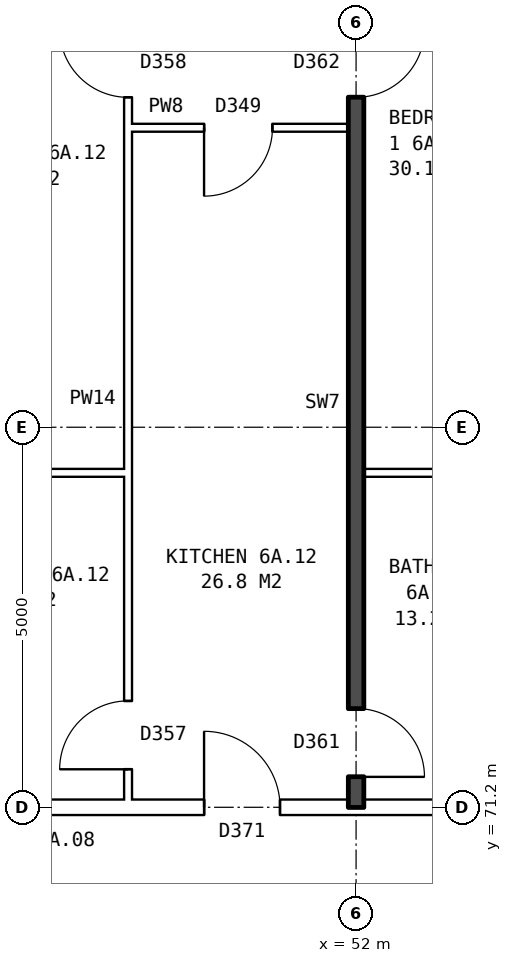
"""IFC4 building model, lengths in metres.
Left out: names, types, materials, properties, quantities, classifications, styles, units other than length and angle.
Written with IfcOpenShell. Run it as: python <this file> out.ifc"""

import sys

from ifc_helpers import new_model, si_unit, direction, frame, frame_2d, origin, place, context, subcontext, project, spatial, rectangle, extrude, element, fill, save


model = new_model("IFC4")
c1 = context("Model", 3, precision=1e-05, world=origin(), true_north=direction((0.0, 1.0)))
c2 = subcontext(c1, "Body", "Model", "MODEL_VIEW")
j1 = project(units=[si_unit("LENGTHUNIT", "METRE"), si_unit("PLANEANGLEUNIT", "RADIAN")], contexts=[c1])
p1 = place(None, origin())
s1 = spatial("IfcSite", under=j1, at=p1, CompositionType="ELEMENT")
p2 = place(p1, origin())
s2 = spatial("IfcBuilding", under=s1, at=p2, CompositionType="ELEMENT")
p3 = place(p2, frame((0.0, 0.0, 25.7)))
s3 = spatial("IfcBuildingStorey", under=s2, at=p3, CompositionType="ELEMENT", Elevation=25.7)
p4 = place(p3, frame((44.36, 71.2, 0.0), z_axis=(0.0, 0.0, 1.0), x_axis=(1.0, 0.0, 0.0)))
e1 = element("IfcWall", 1, at=p4, inside=s3, PredefinedType="PARTITIONING", context=c2, shape_type="SweptSolid", body=[
    extrude(rectangle(XDim=19.28, YDim=0.2, at=frame_2d((9.64, 0.0))), origin(), (0.0, 0.0, 1.0), 2.85),
])
p5 = place(p4, frame((14.64, 0.0, 0.0)))
e2 = element("IfcOpeningElement", 2, at=p5, cuts=e1, PredefinedType="OPENING", context=c2, shape_type="SweptSolid", body=[
    extrude(rectangle(XDim=1.0, YDim=2.1, at=frame_2d((0.5, 1.05))), frame((0.0, 0.11, 0.0), z_axis=(0.0, -1.0, 0.0), x_axis=(1.0, 0.0, 0.0)), (0.0, 0.0, 1.0), 0.22),
])
p6 = place(p4, frame((5.64, 0.0, 0.0)))
e3 = element("IfcOpeningElement", 3, at=p6, cuts=e1, PredefinedType="OPENING", context=c2, shape_type="SweptSolid", body=[
    extrude(rectangle(XDim=1.0, YDim=2.1, at=frame_2d((0.5, 1.05))), frame((0.0, 0.11, 0.0), z_axis=(0.0, -1.0, 0.0), x_axis=(1.0, 0.0, 0.0)), (0.0, 0.0, 1.0), 0.22),
])
p7 = place(p3, frame((46.1, 75.6, 0.0), z_axis=(0.0, 0.0, 1.0), x_axis=(1.0, 0.0, 0.0)))
e4 = element("IfcWall", 4, at=p7, inside=s3, PredefinedType="PARTITIONING", context=c2, shape_type="SweptSolid", body=[
    extrude(rectangle(XDim=2.9, YDim=0.1, at=frame_2d((1.45, 0.0))), origin(), (0.0, 0.0, 1.0), 2.85),
])
p8 = place(p3, frame((52.1, 75.6, 0.0), z_axis=(0.0, 0.0, 1.0), x_axis=(1.0, 0.0, 0.0)))
e5 = element("IfcWall", 5, at=p8, inside=s3, PredefinedType="PARTITIONING", context=c2, shape_type="SweptSolid", body=[
    extrude(rectangle(XDim=2.8, YDim=0.1, at=frame_2d((1.4, 0.0))), origin(), (0.0, 0.0, 1.0), 2.85),
])
p9 = place(p3, frame((49.0, 80.14, 0.0), z_axis=(0.0, 0.0, 1.0), x_axis=(1.0, 0.0, 0.0)))
e6 = element("IfcWall", 6, at=p9, inside=s3, PredefinedType="PARTITIONING", context=c2, shape_type="SweptSolid", body=[
    extrude(rectangle(XDim=2.9, YDim=0.1, at=frame_2d((1.45, 0.0))), origin(), (0.0, 0.0, 1.0), 2.85),
])
p10 = place(p9, frame((1.0, 0.0, 0.0)))
e7 = element("IfcOpeningElement", 7, at=p10, cuts=e6, PredefinedType="OPENING", context=c2, shape_type="SweptSolid", body=[
    extrude(rectangle(XDim=0.9, YDim=2.1, at=frame_2d((0.45, 1.05))), frame((0.0, 0.06, 0.0), z_axis=(0.0, -1.0, 0.0), x_axis=(1.0, 0.0, 0.0)), (0.0, 0.0, 1.0), 0.12),
])
p11 = place(p3, frame((49.0, 71.3, 0.0), z_axis=(0.0, 0.0, 1.0), x_axis=(0.0, 1.0, 0.0)))
e8 = element("IfcWall", 8, at=p11, inside=s3, PredefinedType="PARTITIONING", context=c2, shape_type="SweptSolid", body=[
    extrude(rectangle(XDim=14.34, YDim=0.1, at=frame_2d((7.17, 0.0))), origin(), (0.0, 0.0, 1.0), 2.85),
])
p12 = place(p11, frame((9.24, 0.0, 0.0)))
e9 = element("IfcOpeningElement", 9, at=p12, cuts=e8, PredefinedType="OPENING", context=c2, shape_type="SweptSolid", body=[
    extrude(rectangle(XDim=0.9, YDim=2.1, at=frame_2d((0.45, 1.05))), frame((0.0, 0.06, 0.0), z_axis=(0.0, -1.0, 0.0), x_axis=(1.0, 0.0, 0.0)), (0.0, 0.0, 1.0), 0.12),
])
p13 = place(p11, frame((0.4, 0.0, 0.0)))
e10 = element("IfcOpeningElement", 10, at=p13, cuts=e8, PredefinedType="OPENING", context=c2, shape_type="SweptSolid", body=[
    extrude(rectangle(XDim=0.9, YDim=2.1, at=frame_2d((0.45, 1.05))), frame((0.0, 0.06, 0.0), z_axis=(0.0, -1.0, 0.0), x_axis=(1.0, 0.0, 0.0)), (0.0, 0.0, 1.0), 0.12),
])
p14 = place(p3, frame((52.0, 71.2, 0.0), z_axis=(0.0, 0.0, 1.0), x_axis=(0.0, 1.0, 0.0)))
e11 = element("IfcWall", 11, at=p14, inside=s3, PredefinedType="SOLIDWALL", context=c2, shape_type="SweptSolid", body=[
    extrude(rectangle(XDim=14.44, YDim=0.2, at=frame_2d((7.22, 0.0))), origin(), (0.0, 0.0, 1.0), 2.85),
])
p15 = place(p14, frame((9.34, 0.0, 0.0)))
e12 = element("IfcOpeningElement", 12, at=p15, cuts=e11, PredefinedType="OPENING", context=c2, shape_type="SweptSolid", body=[
    extrude(rectangle(XDim=0.9, YDim=2.1, at=frame_2d((0.45, 1.05))), frame((0.0, 0.11, 0.0), z_axis=(0.0, -1.0, 0.0), x_axis=(1.0, 0.0, 0.0)), (0.0, 0.0, 1.0), 0.22),
])
p16 = place(p14, frame((0.4, 0.0, 0.0)))
e13 = element("IfcOpeningElement", 13, at=p16, cuts=e11, PredefinedType="OPENING", context=c2, shape_type="SweptSolid", body=[
    extrude(rectangle(XDim=0.9, YDim=2.1, at=frame_2d((0.45, 1.05))), frame((0.0, 0.11, 0.0), z_axis=(0.0, -1.0, 0.0), x_axis=(1.0, 0.0, 0.0)), (0.0, 0.0, 1.0), 0.22),
])
p17 = place(p15, frame((0.9, 0.0, 0.0), z_axis=(0.0, 0.0, 1.0), x_axis=(-1.0, 0.0, 0.0)))
e14 = element("IfcDoor", 14, at=p17, inside=s3, OperationType="SINGLE_SWING_LEFT", PredefinedType="DOOR", context=c2, shape_type="SweptSolid", body=[
    extrude(rectangle(XDim=0.9, YDim=2.1, at=frame_2d((0.45, 1.05))), frame((0.0, 0.025, 0.0), z_axis=(0.0, -1.0, 0.0), x_axis=(1.0, 0.0, 0.0)), (0.0, 0.0, 1.0), 0.05),
])
fill(e12, e14)
p18 = place(p12, origin())
e15 = element("IfcDoor", 15, at=p18, inside=s3, OperationType="SINGLE_SWING_RIGHT", PredefinedType="DOOR", context=c2, shape_type="SweptSolid", body=[
    extrude(rectangle(XDim=0.9, YDim=2.1, at=frame_2d((0.45, 1.05))), frame((0.0, 0.025, 0.0), z_axis=(0.0, -1.0, 0.0), x_axis=(1.0, 0.0, 0.0)), (0.0, 0.0, 1.0), 0.05),
])
fill(e9, e15)
p19 = place(p6, origin())
e16 = element("IfcDoor", 16, at=p19, inside=s3, OperationType="SINGLE_SWING_LEFT", PredefinedType="DOOR", context=c2, shape_type="SweptSolid", body=[
    extrude(rectangle(XDim=1.0, YDim=2.1, at=frame_2d((0.5, 1.05))), frame((0.0, 0.025, 0.0), z_axis=(0.0, -1.0, 0.0), x_axis=(1.0, 0.0, 0.0)), (0.0, 0.0, 1.0), 0.05),
])
fill(e3, e16)
p20 = place(p10, frame((0.9, 0.0, 0.0), z_axis=(0.0, 0.0, 1.0), x_axis=(-1.0, 0.0, 0.0)))
e17 = element("IfcDoor", 17, at=p20, inside=s3, OperationType="SINGLE_SWING_RIGHT", PredefinedType="DOOR", context=c2, shape_type="SweptSolid", body=[
    extrude(rectangle(XDim=0.9, YDim=2.1, at=frame_2d((0.45, 1.05))), frame((0.0, 0.025, 0.0), z_axis=(0.0, -1.0, 0.0), x_axis=(1.0, 0.0, 0.0)), (0.0, 0.0, 1.0), 0.05),
])
fill(e7, e17)
p21 = place(p16, frame((0.9, 0.0, 0.0), z_axis=(0.0, 0.0, 1.0), x_axis=(-1.0, 0.0, 0.0)))
e18 = element("IfcDoor", 18, at=p21, inside=s3, OperationType="SINGLE_SWING_RIGHT", PredefinedType="DOOR", context=c2, shape_type="SweptSolid", body=[
    extrude(rectangle(XDim=0.9, YDim=2.1, at=frame_2d((0.45, 1.05))), frame((0.0, 0.025, 0.0), z_axis=(0.0, -1.0, 0.0), x_axis=(1.0, 0.0, 0.0)), (0.0, 0.0, 1.0), 0.05),
])
fill(e13, e18)
p22 = place(p13, origin())
e19 = element("IfcDoor", 19, at=p22, inside=s3, OperationType="SINGLE_SWING_LEFT", PredefinedType="DOOR", context=c2, shape_type="SweptSolid", body=[
    extrude(rectangle(XDim=0.9, YDim=2.1, at=frame_2d((0.45, 1.05))), frame((0.0, 0.025, 0.0), z_axis=(0.0, -1.0, 0.0), x_axis=(1.0, 0.0, 0.0)), (0.0, 0.0, 1.0), 0.05),
])
fill(e10, e19)
save(model, sys.argv[1])
